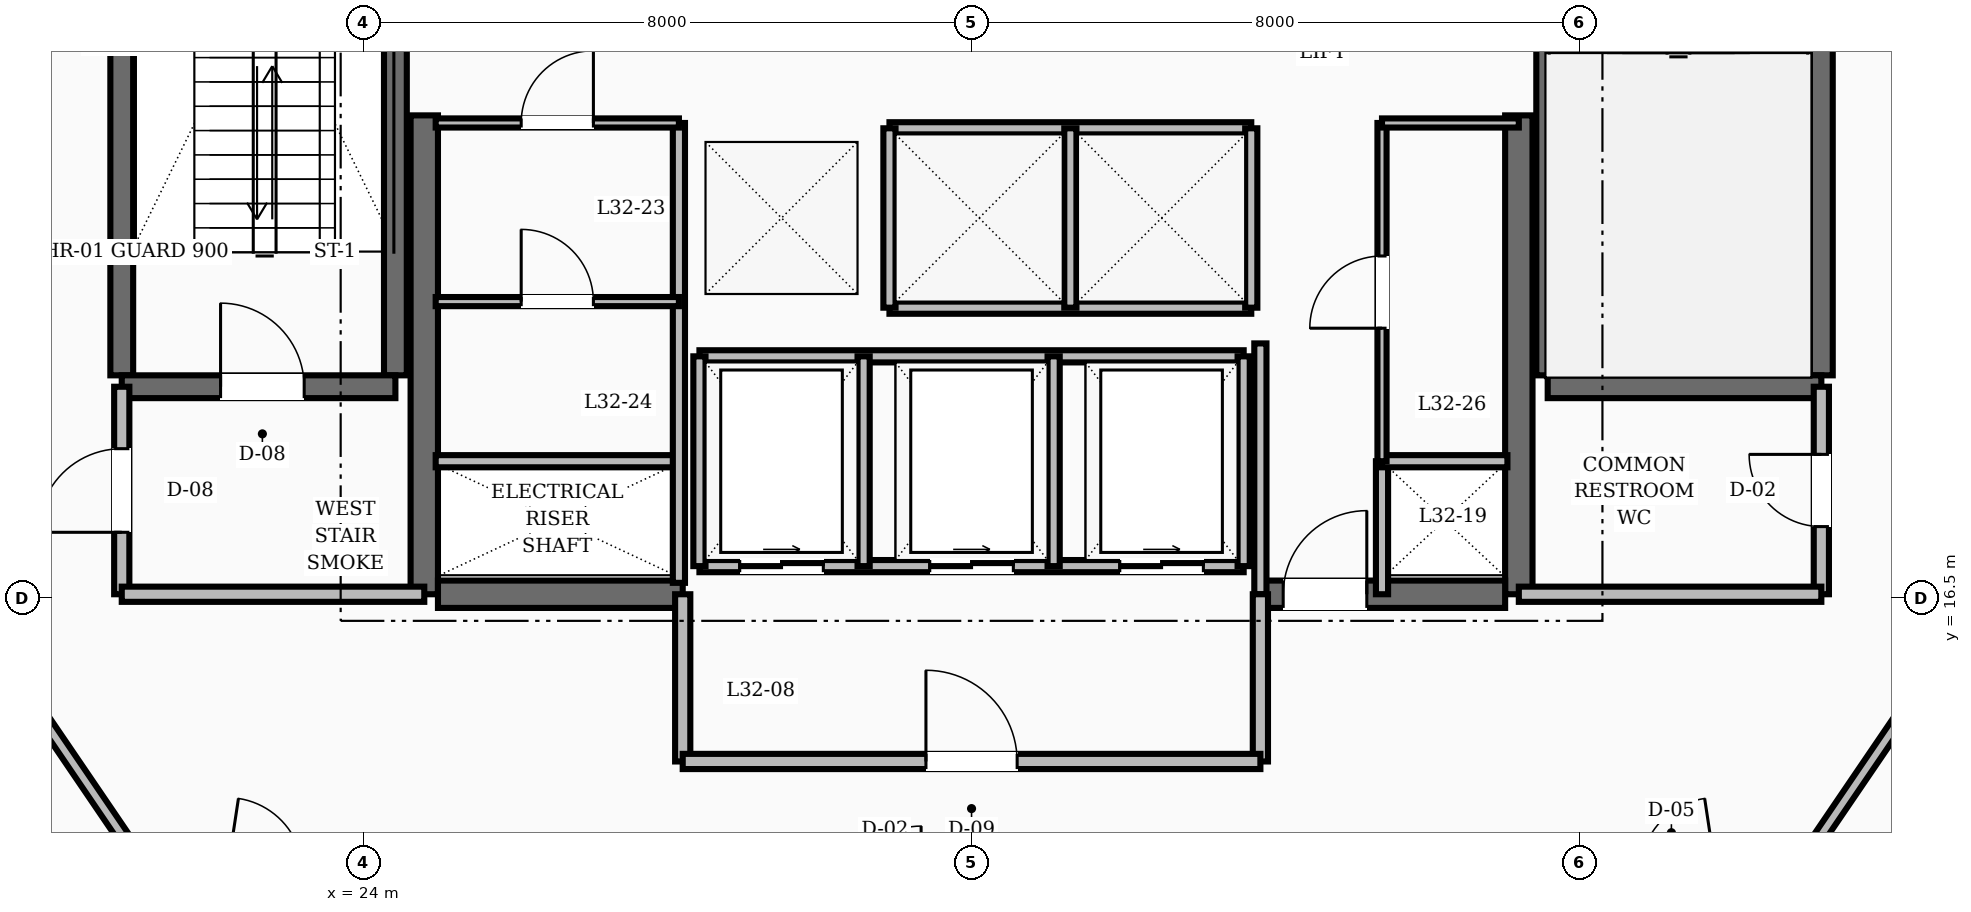
"""IFC4 building model, lengths in metres.
Left out: names, types, materials, properties, quantities, classifications, styles, units other than length and angle.
Written with IfcOpenShell. Run it as: python <this file> out.ifc"""

import sys

from ifc_helpers import new_model, si_unit, direction, frame, frame_2d, origin, place, context, subcontext, project, spatial, rectangle, extrude, element, fill, save


model = new_model("IFC4")
c1 = context("Model", 3, precision=1e-05, world=origin(), true_north=direction((0.0, 1.0)))
c2 = subcontext(c1, "Body", "Model", "MODEL_VIEW")
j1 = project(units=[si_unit("LENGTHUNIT", "METRE"), si_unit("PLANEANGLEUNIT", "RADIAN")], contexts=[c1])
p1 = place(None, origin())
s1 = spatial("IfcSite", under=j1, at=p1, CompositionType="ELEMENT")
p2 = place(p1, origin())
s2 = spatial("IfcBuilding", under=s1, at=p2, CompositionType="ELEMENT")
p3 = place(p2, frame((0.0, 0.0, 128.0)))
s3 = spatial("IfcBuildingStorey", under=s2, at=p3, CompositionType="ELEMENT", Elevation=128.0)
for number, where, z_axis, x_axis in (
    (1, (24.8, 16.55, 0.0), (0.0, 0.0, 1.0), (0.0, 1.0, 0.0)),
    (2, (39.2, 16.55, 0.0), (0.0, 0.0, 1.0), (0.0, 1.0, 0.0)),
):
    element("IfcWall", number, at=place(p3, frame(where, z_axis=z_axis, x_axis=x_axis)), inside=s3, PredefinedType="SHEAR", context=c2, shape_type="SweptSolid", body=[
        extrude(rectangle(XDim=6.3, YDim=0.36, at=frame_2d((3.15, 0.0))), origin(), (0.0, 0.0, 1.0), 3.6),
    ])
p4 = place(p3, frame((24.98, 16.55, 0.0), z_axis=(0.0, 0.0, 1.0), x_axis=(1.0, 0.0, 0.0)))
e3 = element("IfcWall", 3, at=p4, inside=s3, PredefinedType="SHEAR", context=c2, shape_type="SweptSolid", body=[
    extrude(rectangle(XDim=3.22, YDim=0.36, at=frame_2d((1.61, 0.0))), origin(), (0.0, 0.0, 1.0), 3.6),
])
p5 = place(p3, frame((35.8, 16.55, 0.0), z_axis=(0.0, 0.0, 1.0), x_axis=(1.0, 0.0, 0.0)))
e4 = element("IfcWall", 4, at=p5, inside=s3, PredefinedType="SHEAR", context=c2, shape_type="SweptSolid", body=[
    extrude(rectangle(XDim=3.22, YDim=0.36, at=frame_2d((1.61, 0.0))), origin(), (0.0, 0.0, 1.0), 3.6),
])
p6 = place(p5, frame((0.3, 0.0, 0.0)))
e5 = element("IfcOpeningElement", 5, at=p6, cuts=e4, PredefinedType="OPENING", context=c2, shape_type="SweptSolid", body=[
    extrude(rectangle(XDim=1.1, YDim=2.1, at=frame_2d((0.55, 1.05))), frame((0.0, 0.19, 0.0), z_axis=(0.0, -1.0, 0.0), x_axis=(1.0, 0.0, 0.0)), (0.0, 0.0, 1.0), 0.38),
])
for number, where, z_axis, x_axis in (
    (6, (20.82, 19.43, 0.0), (0.0, 0.0, 1.0), (0.0, 1.0, 0.0)),
    (7, (24.42, 19.43, 0.0), (0.0, 0.0, 1.0), (0.0, 1.0, 0.0)),
):
    element("IfcWall", number, at=place(p3, frame(where, z_axis=z_axis, x_axis=x_axis)), inside=s3, PredefinedType="SHEAR", context=c2, shape_type="SweptSolid", body=[
        extrude(rectangle(XDim=8.74, YDim=0.3, at=frame_2d((4.37, 0.0))), origin(), (0.0, 0.0, 1.0), 3.6),
    ])
p7 = place(p3, frame((20.82, 19.28, 0.0), z_axis=(0.0, 0.0, 1.0), x_axis=(1.0, 0.0, 0.0)))
e8 = element("IfcWall", 8, at=p7, inside=s3, PredefinedType="SHEAR", context=c2, shape_type="SweptSolid", body=[
    extrude(rectangle(XDim=3.6, YDim=0.3, at=frame_2d((1.8, 0.0))), origin(), (0.0, 0.0, 1.0), 3.6),
])
p8 = place(p7, frame((1.3, 0.0, 0.0)))
e9 = element("IfcOpeningElement", 9, at=p8, cuts=e8, PredefinedType="OPENING", context=c2, shape_type="SweptSolid", body=[
    extrude(rectangle(XDim=1.1, YDim=2.1, at=frame_2d((0.55, 1.05))), frame((0.0, 0.16, 0.0), z_axis=(0.0, -1.0, 0.0), x_axis=(1.0, 0.0, 0.0)), (0.0, 0.0, 1.0), 0.32),
])
for number, where, z_axis, x_axis in (
    (10, (43.18, 19.43, 0.0), (0.0, 0.0, 1.0), (0.0, 1.0, 0.0)),
    (11, (39.58, 19.43, 0.0), (0.0, 0.0, 1.0), (0.0, 1.0, 0.0)),
):
    element("IfcWall", number, at=place(p3, frame(where, z_axis=z_axis, x_axis=x_axis)), inside=s3, PredefinedType="SHEAR", context=c2, shape_type="SweptSolid", body=[
        extrude(rectangle(XDim=8.74, YDim=0.3, at=frame_2d((4.37, 0.0))), origin(), (0.0, 0.0, 1.0), 3.6),
    ])
p9 = place(p3, frame((39.58, 19.28, 0.0), z_axis=(0.0, 0.0, 1.0), x_axis=(1.0, 0.0, 0.0)))
e12 = element("IfcWall", 12, at=p9, inside=s3, PredefinedType="SHEAR", context=c2, shape_type="SweptSolid", body=[
    extrude(rectangle(XDim=3.6, YDim=0.3, at=frame_2d((1.8, 0.0))), origin(), (0.0, 0.0, 1.0), 3.6),
])
p10 = place(p3, frame((20.82, 16.55, 0.0), z_axis=(0.0, 0.0, 1.0), x_axis=(0.0, 1.0, 0.0)))
e13 = element("IfcWall", 13, at=p10, inside=s3, PredefinedType="SOLIDWALL", context=c2, shape_type="SweptSolid", body=[
    extrude(rectangle(XDim=2.73, YDim=0.2, at=frame_2d((1.365, 0.0))), origin(), (0.0, 0.0, 1.0), 2.8),
])
p11 = place(p10, frame((0.815, 0.0, 0.0)))
e14 = element("IfcOpeningElement", 14, at=p11, cuts=e13, PredefinedType="OPENING", context=c2, shape_type="SweptSolid", body=[
    extrude(rectangle(XDim=1.1, YDim=2.1, at=frame_2d((0.55, 1.05))), frame((0.0, 0.11, 0.0), z_axis=(0.0, -1.0, 0.0), x_axis=(1.0, 0.0, 0.0)), (0.0, 0.0, 1.0), 0.22),
])
p12 = place(p3, frame((20.82, 16.55, 0.0), z_axis=(0.0, 0.0, 1.0), x_axis=(1.0, 0.0, 0.0)))
e15 = element("IfcWall", 15, at=p12, inside=s3, PredefinedType="SOLIDWALL", context=c2, shape_type="SweptSolid", body=[
    extrude(rectangle(XDim=3.98, YDim=0.2, at=frame_2d((1.99, 0.0))), origin(), (0.0, 0.0, 1.0), 2.8),
])
p13 = place(p3, frame((43.18, 16.55, 0.0), z_axis=(0.0, 0.0, 1.0), x_axis=(0.0, 1.0, 0.0)))
e16 = element("IfcWall", 16, at=p13, inside=s3, PredefinedType="SOLIDWALL", context=c2, shape_type="SweptSolid", body=[
    extrude(rectangle(XDim=2.73, YDim=0.2, at=frame_2d((1.365, 0.0))), origin(), (0.0, 0.0, 1.0), 2.8),
])
p14 = place(p13, frame((0.89, 0.0, 0.0)))
e17 = element("IfcOpeningElement", 17, at=p14, cuts=e16, PredefinedType="OPENING", context=c2, shape_type="SweptSolid", body=[
    extrude(rectangle(XDim=0.95, YDim=2.1, at=frame_2d((0.475, 1.05))), frame((0.0, 0.11, 0.0), z_axis=(0.0, -1.0, 0.0), x_axis=(1.0, 0.0, 0.0)), (0.0, 0.0, 1.0), 0.22),
])
p15 = place(p3, frame((39.2, 16.55, 0.0), z_axis=(0.0, 0.0, 1.0), x_axis=(1.0, 0.0, 0.0)))
e18 = element("IfcWall", 18, at=p15, inside=s3, PredefinedType="SOLIDWALL", context=c2, shape_type="SweptSolid", body=[
    extrude(rectangle(XDim=3.98, YDim=0.2, at=frame_2d((1.99, 0.0))), origin(), (0.0, 0.0, 1.0), 2.8),
])
p16 = place(p3, frame((35.8, 16.55, 0.0), z_axis=(0.0, 0.0, 1.0), x_axis=(0.0, 1.0, 0.0)))
e19 = element("IfcWall", 19, at=p16, inside=s3, PredefinedType="SOLIDWALL", context=c2, shape_type="SweptSolid", body=[
    extrude(rectangle(XDim=3.3, YDim=0.16, at=frame_2d((1.65, 0.0))), origin(), (0.0, 0.0, 1.0), 2.8),
])
p17 = place(p3, frame((37.4, 16.55, 0.0), z_axis=(0.0, 0.0, 1.0), x_axis=(0.0, 1.0, 0.0)))
e20 = element("IfcWall", 20, at=p17, inside=s3, PredefinedType="SOLIDWALL", context=c2, shape_type="SweptSolid", body=[
    extrude(rectangle(XDim=1.75, YDim=0.16, at=frame_2d((0.875, 0.0))), origin(), (0.0, 0.0, 1.0), 2.8),
])
for number, where, z_axis, x_axis in (
    (21, (28.2, 14.35, 0.0), (0.0, 0.0, 1.0), (0.0, 1.0, 0.0)),
    (22, (35.8, 14.35, 0.0), (0.0, 0.0, 1.0), (0.0, 1.0, 0.0)),
):
    element("IfcWall", number, at=place(p3, frame(where, z_axis=z_axis, x_axis=x_axis)), inside=s3, PredefinedType="SOLIDWALL", context=c2, shape_type="SweptSolid", body=[
        extrude(rectangle(XDim=2.2, YDim=0.2, at=frame_2d((1.1, 0.0))), origin(), (0.0, 0.0, 1.0), 2.8),
    ])
p18 = place(p3, frame((28.2, 14.35, 0.0), z_axis=(0.0, 0.0, 1.0), x_axis=(1.0, 0.0, 0.0)))
e23 = element("IfcWall", 23, at=p18, inside=s3, PredefinedType="SOLIDWALL", context=c2, shape_type="SweptSolid", body=[
    extrude(rectangle(XDim=7.6, YDim=0.2, at=frame_2d((3.8, 0.0))), origin(), (0.0, 0.0, 1.0), 2.8),
])
p19 = place(p18, frame((3.2, 0.0, 0.0)))
e24 = element("IfcOpeningElement", 24, at=p19, cuts=e23, PredefinedType="OPENING", context=c2, shape_type="SweptSolid", body=[
    extrude(rectangle(XDim=1.2, YDim=2.1, at=frame_2d((0.6, 1.05))), frame((0.0, 0.11, 0.0), z_axis=(0.0, -1.0, 0.0), x_axis=(1.0, 0.0, 0.0)), (0.0, 0.0, 1.0), 0.22),
])
for number, where, z_axis, x_axis in (
    (25, (30.92, 22.68, 0.0), (0.0, 0.0, 1.0), (1.0, 0.0, 0.0)),
    (26, (30.92, 20.32, 0.0), (0.0, 0.0, 1.0), (1.0, 0.0, 0.0)),
):
    element("IfcWall", number, at=place(p3, frame(where, z_axis=z_axis, x_axis=x_axis)), inside=s3, PredefinedType="SOLIDWALL", context=c2, shape_type="SweptSolid", body=[
        extrude(rectangle(XDim=4.76, YDim=0.16, at=frame_2d((2.38, 0.0))), origin(), (0.0, 0.0, 1.0), 2.8),
    ])
for number, where, z_axis, x_axis in (
    (27, (30.92, 20.32, 0.0), (0.0, 0.0, 1.0), (0.0, 1.0, 0.0)),
    (28, (33.3, 20.32, 0.0), (0.0, 0.0, 1.0), (0.0, 1.0, 0.0)),
    (29, (35.68, 20.32, 0.0), (0.0, 0.0, 1.0), (0.0, 1.0, 0.0)),
):
    element("IfcWall", number, at=place(p3, frame(where, z_axis=z_axis, x_axis=x_axis)), inside=s3, PredefinedType="SOLIDWALL", context=c2, shape_type="SweptSolid", body=[
        extrude(rectangle(XDim=2.36, YDim=0.16, at=frame_2d((1.18, 0.0))), origin(), (0.0, 0.0, 1.0), 2.8),
    ])
p20 = place(p3, frame((28.42, 16.92, 0.0), z_axis=(0.0, 0.0, 1.0), x_axis=(1.0, 0.0, 0.0)))
e30 = element("IfcWall", 30, at=p20, inside=s3, PredefinedType="SOLIDWALL", context=c2, shape_type="SweptSolid", body=[
    extrude(rectangle(XDim=7.16, YDim=0.16, at=frame_2d((3.58, 0.0))), origin(), (0.0, 0.0, 1.0), 2.8),
])
p21 = place(p20, frame((0.53, 0.0, 0.0)))
e31 = element("IfcOpeningElement", 31, at=p21, cuts=e30, PredefinedType="OPENING", context=c2, shape_type="SweptSolid", body=[
    extrude(rectangle(XDim=1.1, YDim=2.15, at=frame_2d((0.55, 1.075))), frame((0.0, 0.09, 0.0), z_axis=(0.0, -1.0, 0.0), x_axis=(1.0, 0.0, 0.0)), (0.0, 0.0, 1.0), 0.18),
])
p22 = place(p20, frame((3.03, 0.0, 0.0)))
e32 = element("IfcOpeningElement", 32, at=p22, cuts=e30, PredefinedType="OPENING", context=c2, shape_type="SweptSolid", body=[
    extrude(rectangle(XDim=1.1, YDim=2.15, at=frame_2d((0.55, 1.075))), frame((0.0, 0.09, 0.0), z_axis=(0.0, -1.0, 0.0), x_axis=(1.0, 0.0, 0.0)), (0.0, 0.0, 1.0), 0.18),
])
p23 = place(p20, frame((5.53, 0.0, 0.0)))
e33 = element("IfcOpeningElement", 33, at=p23, cuts=e30, PredefinedType="OPENING", context=c2, shape_type="SweptSolid", body=[
    extrude(rectangle(XDim=1.1, YDim=2.15, at=frame_2d((0.55, 1.075))), frame((0.0, 0.09, 0.0), z_axis=(0.0, -1.0, 0.0), x_axis=(1.0, 0.0, 0.0)), (0.0, 0.0, 1.0), 0.18),
])
p24 = place(p3, frame((28.42, 19.68, 0.0), z_axis=(0.0, 0.0, 1.0), x_axis=(1.0, 0.0, 0.0)))
e34 = element("IfcWall", 34, at=p24, inside=s3, PredefinedType="SOLIDWALL", context=c2, shape_type="SweptSolid", body=[
    extrude(rectangle(XDim=7.16, YDim=0.16, at=frame_2d((3.58, 0.0))), origin(), (0.0, 0.0, 1.0), 2.8),
])
for number, where, z_axis, x_axis in (
    (35, (28.42, 16.92, 0.0), (0.0, 0.0, 1.0), (0.0, 1.0, 0.0)),
    (36, (30.58, 16.92, 0.0), (0.0, 0.0, 1.0), (0.0, 1.0, 0.0)),
    (37, (33.08, 16.92, 0.0), (0.0, 0.0, 1.0), (0.0, 1.0, 0.0)),
    (38, (35.58, 16.92, 0.0), (0.0, 0.0, 1.0), (0.0, 1.0, 0.0)),
):
    element("IfcWall", number, at=place(p3, frame(where, z_axis=z_axis, x_axis=x_axis)), inside=s3, PredefinedType="SOLIDWALL", context=c2, shape_type="SweptSolid", body=[
        extrude(rectangle(XDim=2.76, YDim=0.16, at=frame_2d((1.38, 0.0))), origin(), (0.0, 0.0, 1.0), 2.8),
    ])
p25 = place(p3, frame((24.95, 18.3, 0.0), z_axis=(0.0, 0.0, 1.0), x_axis=(1.0, 0.0, 0.0)))
e39 = element("IfcWall", 39, at=p25, inside=s3, PredefinedType="SOLIDWALL", context=c2, shape_type="SweptSolid", body=[
    extrude(rectangle(XDim=3.2, YDim=0.16, at=frame_2d((1.6, 0.0))), origin(), (0.0, 0.0, 1.0), 2.8),
])
p26 = place(p3, frame((28.15, 16.7, 0.0), z_axis=(0.0, 0.0, 1.0), x_axis=(0.0, 1.0, 0.0)))
e40 = element("IfcWall", 40, at=p26, inside=s3, PredefinedType="SOLIDWALL", context=c2, shape_type="SweptSolid", body=[
    extrude(rectangle(XDim=6.05, YDim=0.16, at=frame_2d((3.025, 0.0))), origin(), (0.0, 0.0, 1.0), 2.8),
])
p27 = place(p3, frame((37.4, 18.3, 0.0), z_axis=(0.0, 0.0, 1.0), x_axis=(1.0, 0.0, 0.0)))
e41 = element("IfcWall", 41, at=p27, inside=s3, PredefinedType="SOLIDWALL", context=c2, shape_type="SweptSolid", body=[
    extrude(rectangle(XDim=1.65, YDim=0.16, at=frame_2d((0.825, 0.0))), origin(), (0.0, 0.0, 1.0), 2.8),
])
p28 = place(p3, frame((24.95, 22.75, 0.0), z_axis=(0.0, 0.0, 1.0), x_axis=(1.0, 0.0, 0.0)))
e42 = element("IfcWall", 42, at=p28, inside=s3, PredefinedType="PARTITIONING", context=c2, shape_type="SweptSolid", body=[
    extrude(rectangle(XDim=3.2, YDim=0.12, at=frame_2d((1.6, 0.0))), origin(), (0.0, 0.0, 1.0), 2.8),
])
p29 = place(p28, frame((1.125, 0.0, 0.0)))
e43 = element("IfcOpeningElement", 43, at=p29, cuts=e42, PredefinedType="OPENING", context=c2, shape_type="SweptSolid", body=[
    extrude(rectangle(XDim=0.95, YDim=2.1, at=frame_2d((0.475, 1.05))), frame((0.0, 0.07, 0.0), z_axis=(0.0, -1.0, 0.0), x_axis=(1.0, 0.0, 0.0)), (0.0, 0.0, 1.0), 0.14),
])
p30 = place(p3, frame((37.4, 18.3, 0.0), z_axis=(0.0, 0.0, 1.0), x_axis=(0.0, 1.0, 0.0)))
e44 = element("IfcWall", 44, at=p30, inside=s3, PredefinedType="PARTITIONING", context=c2, shape_type="SweptSolid", body=[
    extrude(rectangle(XDim=4.45, YDim=0.12, at=frame_2d((2.225, 0.0))), origin(), (0.0, 0.0, 1.0), 2.8),
])
p31 = place(p30, frame((1.75, 0.0, 0.0)))
e45 = element("IfcOpeningElement", 45, at=p31, cuts=e44, PredefinedType="OPENING", context=c2, shape_type="SweptSolid", body=[
    extrude(rectangle(XDim=0.95, YDim=2.1, at=frame_2d((0.475, 1.05))), frame((0.0, 0.07, 0.0), z_axis=(0.0, -1.0, 0.0), x_axis=(1.0, 0.0, 0.0)), (0.0, 0.0, 1.0), 0.14),
])
p32 = place(p3, frame((37.4, 22.75, 0.0), z_axis=(0.0, 0.0, 1.0), x_axis=(1.0, 0.0, 0.0)))
e46 = element("IfcWall", 46, at=p32, inside=s3, PredefinedType="PARTITIONING", context=c2, shape_type="SweptSolid", body=[
    extrude(rectangle(XDim=1.8, YDim=0.12, at=frame_2d((0.9, 0.0))), origin(), (0.0, 0.0, 1.0), 2.8),
])
p33 = place(p3, frame((24.95, 20.4, 0.0), z_axis=(0.0, 0.0, 1.0), x_axis=(1.0, 0.0, 0.0)))
e47 = element("IfcWall", 47, at=p33, inside=s3, PredefinedType="PARTITIONING", context=c2, shape_type="SweptSolid", body=[
    extrude(rectangle(XDim=3.2, YDim=0.12, at=frame_2d((1.6, 0.0))), origin(), (0.0, 0.0, 1.0), 2.8),
])
p34 = place(p33, frame((1.125, 0.0, 0.0)))
e48 = element("IfcOpeningElement", 48, at=p34, cuts=e47, PredefinedType="OPENING", context=c2, shape_type="SweptSolid", body=[
    extrude(rectangle(XDim=0.95, YDim=2.1, at=frame_2d((0.475, 1.05))), frame((0.0, 0.07, 0.0), z_axis=(0.0, -1.0, 0.0), x_axis=(1.0, 0.0, 0.0)), (0.0, 0.0, 1.0), 0.14),
])
for number, where, z_axis, x_axis in (
    (49, (19.35, 15.548, 0.0), (0.0, 0.0, 1.0), (0.563, -0.827, 0.0)),
    (50, (42.95, 13.05, 0.0), (0.0, 0.0, 1.0), (0.563, 0.827, 0.0)),
):
    element("IfcWall", number, at=place(p3, frame(where, z_axis=z_axis, x_axis=x_axis)), inside=s3, PredefinedType="SOLIDWALL", context=c2, shape_type="SweptSolid", body=[
        extrude(rectangle(XDim=3.021, YDim=0.16, at=frame_2d((1.511, 0.0))), origin(), (0.0, 0.0, 1.0), 2.8),
    ])
p35 = place(p8, origin())
e51 = element("IfcDoor", 51, at=p35, inside=s3, OperationType="SINGLE_SWING_LEFT", PredefinedType="DOOR", context=c2, shape_type="SweptSolid", body=[
    extrude(rectangle(XDim=1.1, YDim=2.1, at=frame_2d((0.55, 1.05))), frame((0.0, 0.025, 0.0), z_axis=(0.0, -1.0, 0.0), x_axis=(1.0, 0.0, 0.0)), (0.0, 0.0, 1.0), 0.05),
])
fill(e9, e51)
p36 = place(p11, origin())
e52 = element("IfcDoor", 52, at=p36, inside=s3, OperationType="SINGLE_SWING_LEFT", PredefinedType="DOOR", context=c2, shape_type="SweptSolid", body=[
    extrude(rectangle(XDim=1.1, YDim=2.1, at=frame_2d((0.55, 1.05))), frame((0.0, 0.025, 0.0), z_axis=(0.0, -1.0, 0.0), x_axis=(1.0, 0.0, 0.0)), (0.0, 0.0, 1.0), 0.05),
])
fill(e14, e52)
p37 = place(p14, origin())
e53 = element("IfcDoor", 53, at=p37, inside=s3, OperationType="SINGLE_SWING_RIGHT", PredefinedType="DOOR", context=c2, shape_type="SweptSolid", body=[
    extrude(rectangle(XDim=0.95, YDim=2.1, at=frame_2d((0.475, 1.05))), frame((0.0, 0.025, 0.0), z_axis=(0.0, -1.0, 0.0), x_axis=(1.0, 0.0, 0.0)), (0.0, 0.0, 1.0), 0.05),
])
fill(e17, e53)
p38 = place(p6, origin())
e54 = element("IfcDoor", 54, at=p38, inside=s3, OperationType="SINGLE_SWING_RIGHT", PredefinedType="DOOR", context=c2, shape_type="SweptSolid", body=[
    extrude(rectangle(XDim=1.1, YDim=2.1, at=frame_2d((0.55, 1.05))), frame((0.0, 0.025, 0.0), z_axis=(0.0, -1.0, 0.0), x_axis=(1.0, 0.0, 0.0)), (0.0, 0.0, 1.0), 0.05),
])
fill(e5, e54)
p39 = place(p19, origin())
e55 = element("IfcDoor", 55, at=p39, inside=s3, OperationType="SINGLE_SWING_LEFT", PredefinedType="DOOR", context=c2, shape_type="SweptSolid", body=[
    extrude(rectangle(XDim=1.2, YDim=2.1, at=frame_2d((0.6, 1.05))), frame((0.0, 0.025, 0.0), z_axis=(0.0, -1.0, 0.0), x_axis=(1.0, 0.0, 0.0)), (0.0, 0.0, 1.0), 0.05),
])
fill(e24, e55)
p40 = place(p21, origin())
e56 = element("IfcDoor", 56, at=p40, inside=s3, OperationType="SLIDING_TO_RIGHT", PredefinedType="DOOR", context=c2, shape_type="SweptSolid", body=[
    extrude(rectangle(XDim=1.1, YDim=2.15, at=frame_2d((0.55, 1.075))), frame((0.0, 0.025, 0.0), z_axis=(0.0, -1.0, 0.0), x_axis=(1.0, 0.0, 0.0)), (0.0, 0.0, 1.0), 0.05),
])
fill(e31, e56)
p41 = place(p22, origin())
e57 = element("IfcDoor", 57, at=p41, inside=s3, OperationType="SLIDING_TO_RIGHT", PredefinedType="DOOR", context=c2, shape_type="SweptSolid", body=[
    extrude(rectangle(XDim=1.1, YDim=2.15, at=frame_2d((0.55, 1.075))), frame((0.0, 0.025, 0.0), z_axis=(0.0, -1.0, 0.0), x_axis=(1.0, 0.0, 0.0)), (0.0, 0.0, 1.0), 0.05),
])
fill(e32, e57)
p42 = place(p23, origin())
e58 = element("IfcDoor", 58, at=p42, inside=s3, OperationType="SLIDING_TO_RIGHT", PredefinedType="DOOR", context=c2, shape_type="SweptSolid", body=[
    extrude(rectangle(XDim=1.1, YDim=2.15, at=frame_2d((0.55, 1.075))), frame((0.0, 0.025, 0.0), z_axis=(0.0, -1.0, 0.0), x_axis=(1.0, 0.0, 0.0)), (0.0, 0.0, 1.0), 0.05),
])
fill(e33, e58)
p43 = place(p29, origin())
e59 = element("IfcDoor", 59, at=p43, inside=s3, OperationType="SINGLE_SWING_RIGHT", PredefinedType="DOOR", context=c2, shape_type="SweptSolid", body=[
    extrude(rectangle(XDim=0.95, YDim=2.1, at=frame_2d((0.475, 1.05))), frame((0.0, 0.025, 0.0), z_axis=(0.0, -1.0, 0.0), x_axis=(1.0, 0.0, 0.0)), (0.0, 0.0, 1.0), 0.05),
])
fill(e43, e59)
p44 = place(p34, origin())
e60 = element("IfcDoor", 60, at=p44, inside=s3, OperationType="SINGLE_SWING_LEFT", PredefinedType="DOOR", context=c2, shape_type="SweptSolid", body=[
    extrude(rectangle(XDim=0.95, YDim=2.1, at=frame_2d((0.475, 1.05))), frame((0.0, 0.025, 0.0), z_axis=(0.0, -1.0, 0.0), x_axis=(1.0, 0.0, 0.0)), (0.0, 0.0, 1.0), 0.05),
])
fill(e48, e60)
p45 = place(p31, origin())
e61 = element("IfcDoor", 61, at=p45, inside=s3, OperationType="SINGLE_SWING_LEFT", PredefinedType="DOOR", context=c2, shape_type="SweptSolid", body=[
    extrude(rectangle(XDim=0.95, YDim=2.1, at=frame_2d((0.475, 1.05))), frame((0.0, 0.025, 0.0), z_axis=(0.0, -1.0, 0.0), x_axis=(1.0, 0.0, 0.0)), (0.0, 0.0, 1.0), 0.05),
])
fill(e45, e61)
save(model, sys.argv[1])
